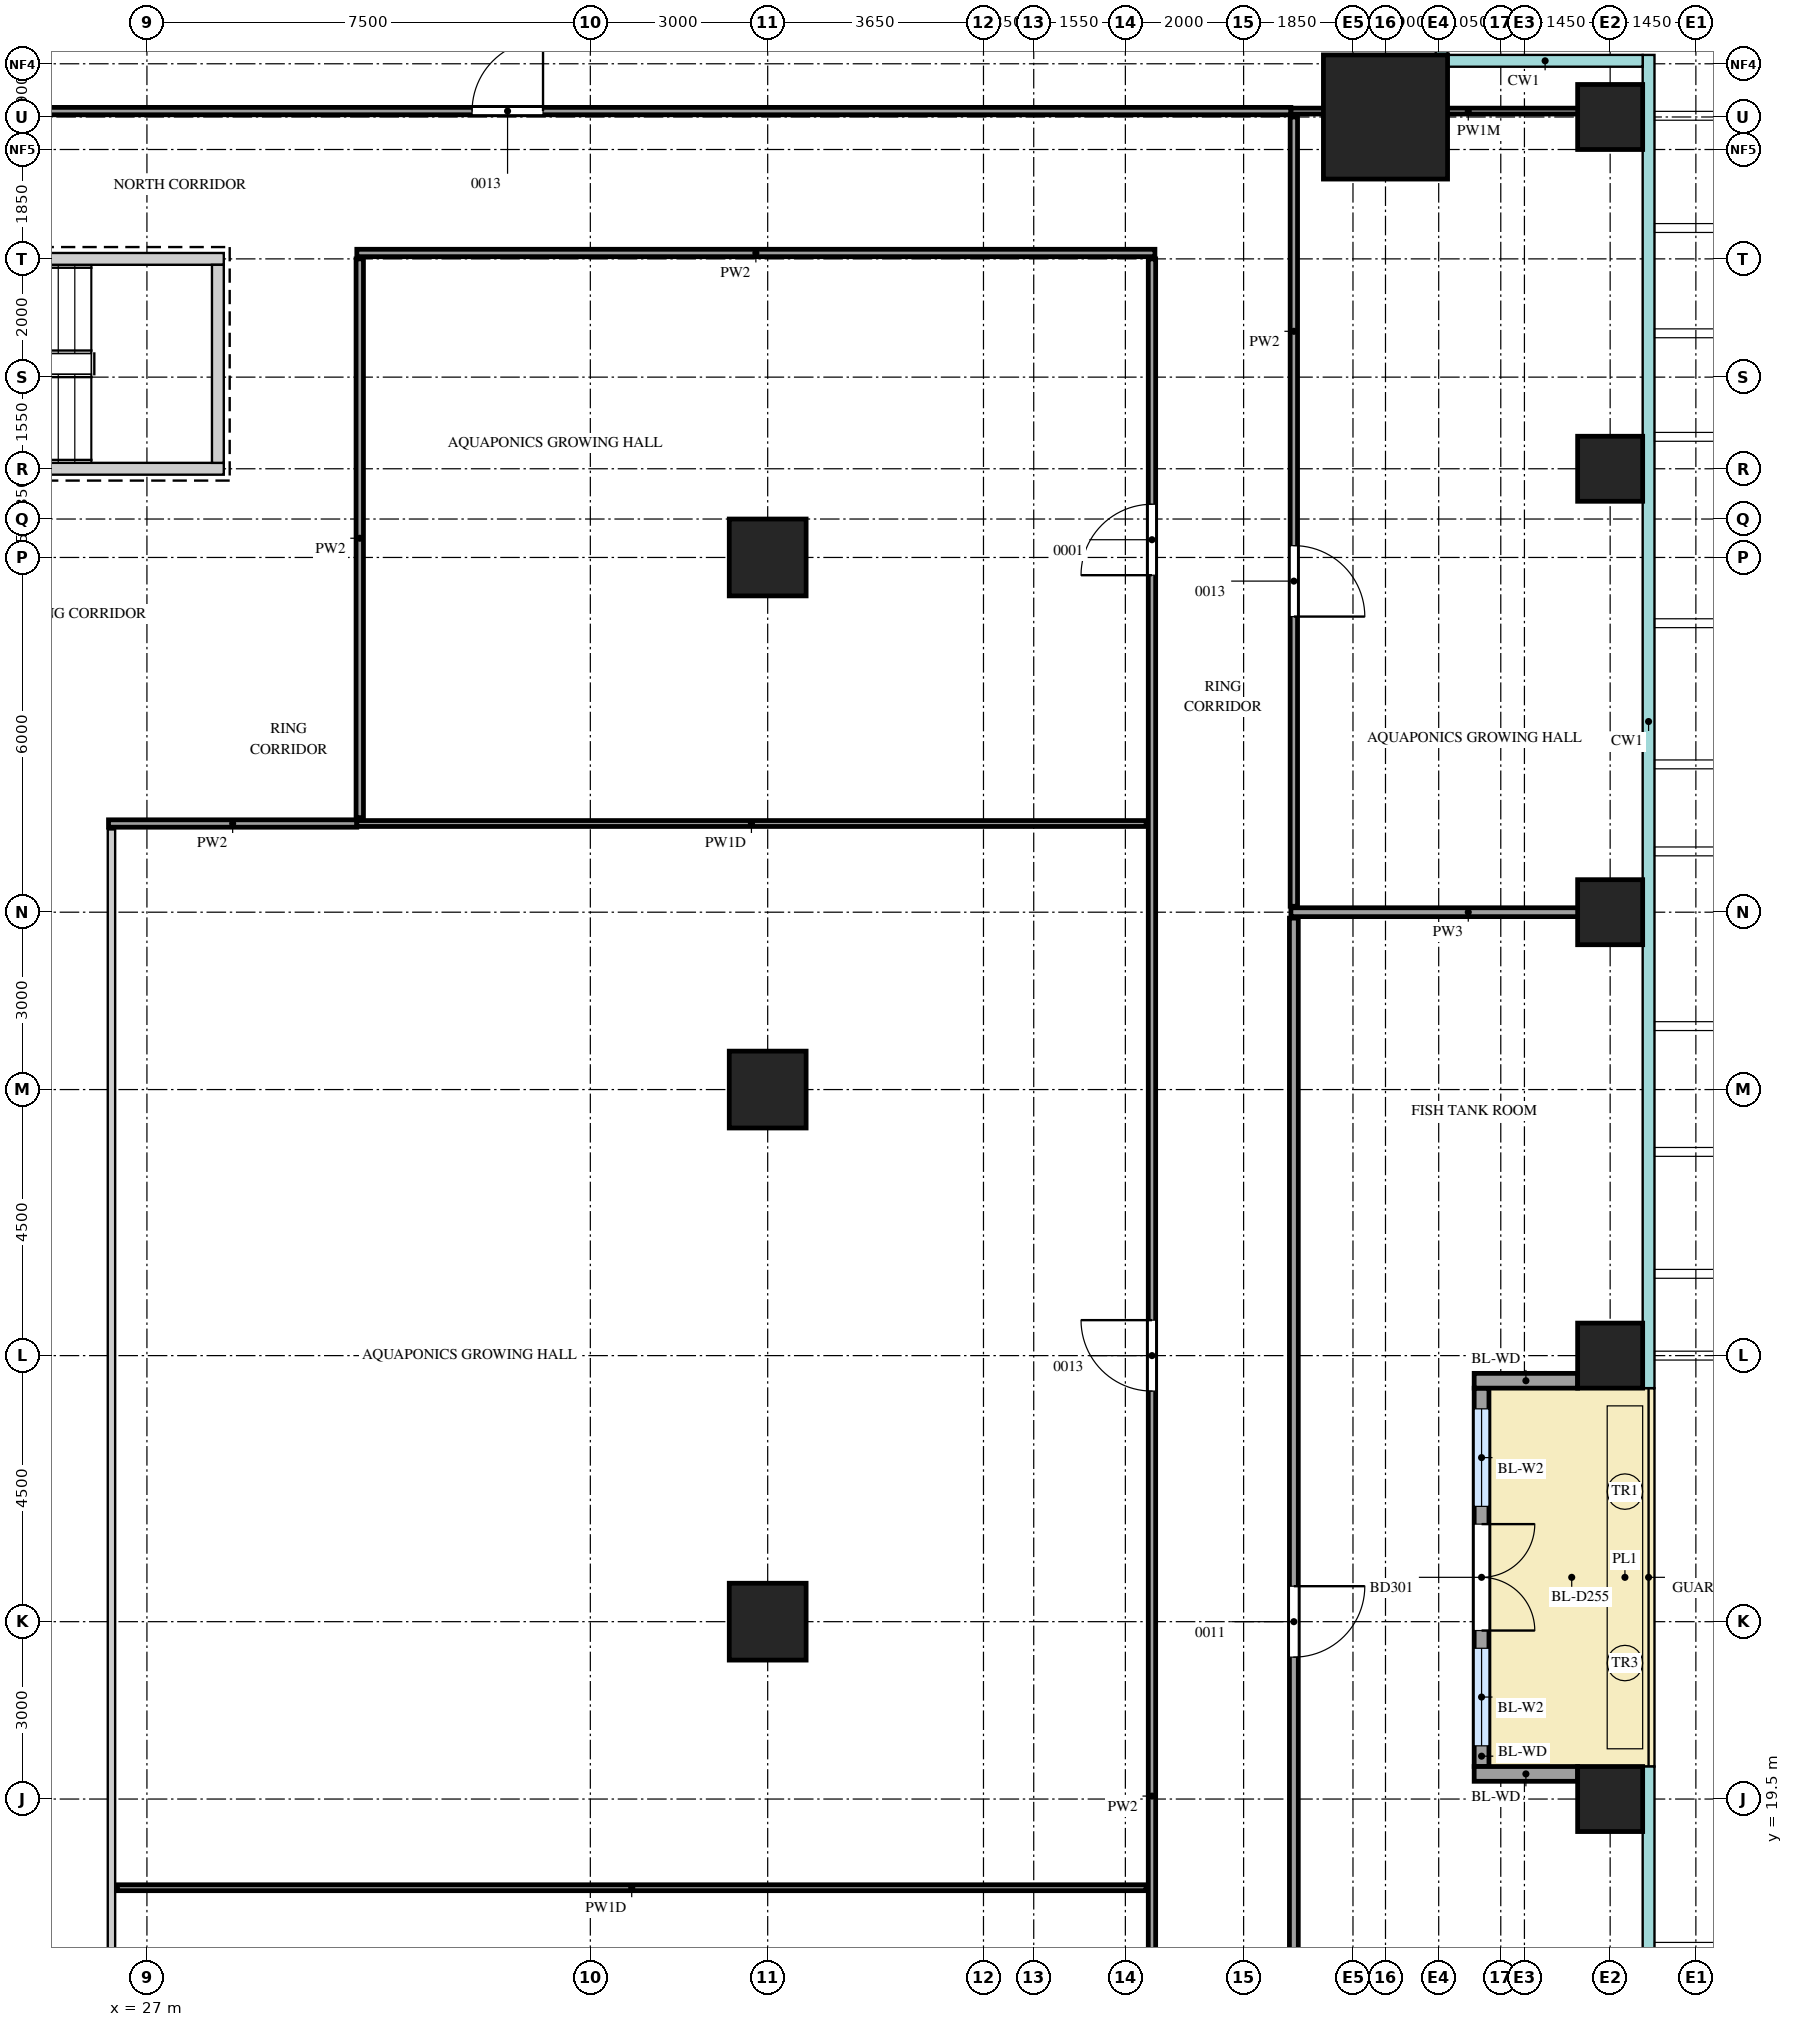
"""IFC4 building model, lengths in metres.
Left out: names, types, materials, properties, quantities, classifications, styles, units other than length and angle.
Written with IfcOpenShell. Run it as: python <this file> out.ifc"""

import sys

from ifc_helpers import new_model, si_unit, direction, frame, frame_2d, origin, origin_2d, place, context, subcontext, project, spatial, rectangle, extrude, source, transform, mapped, element, fill, save


model = new_model("IFC4")
c1 = context("Model", 3, precision=1e-05, world=origin(), true_north=direction((0.0, 1.0)))
c2 = subcontext(c1, "Body", "Model", "MODEL_VIEW")
j1 = project(units=[si_unit("LENGTHUNIT", "METRE"), si_unit("PLANEANGLEUNIT", "RADIAN")], contexts=[c1])
p1 = place(None, origin())
s1 = spatial("IfcSite", under=j1, at=p1, CompositionType="ELEMENT")
p2 = place(p1, origin())
s2 = spatial("IfcBuilding", under=s1, at=p2, CompositionType="ELEMENT")
p3 = place(p2, frame((0.0, 0.0, 141.1)))
s3 = spatial("IfcBuildingStorey", under=s2, at=p3, CompositionType="ELEMENT", Elevation=141.1)
m1 = source(origin(), c2, "Body", "SweptSolid", [
    extrude(rectangle(XDim=7.1, YDim=0.2, at=frame_2d((3.55, 0.0))), origin(), (0.0, 0.0, 1.0), 4.1),
])
p4 = place(p3, frame((21.2, 45.55, 0.0), z_axis=(0.0, 0.0, 1.0), x_axis=(1.0, 0.0, 0.0)))
e1 = element("IfcWall", 1, at=p4, inside=s3, PredefinedType="SHEAR", context=c2, shape_type="MappedRepresentation", body=[
    mapped(m1, transform((0.0, 0.0, 0.0))),
])
m2 = source(origin(), c2, "Body", "SweptSolid", [
    extrude(rectangle(XDim=1.2, YDim=2.1, at=frame_2d((0.6, 1.05))), frame((0.0, 0.11, 0.0), z_axis=(0.0, -1.0, 0.0), x_axis=(1.0, 0.0, 0.0)), (0.0, 0.0, 1.0), 0.22),
])
p5 = place(p4, frame((0.15, 0.0, 0.0)))
e2 = element("IfcOpeningElement", 2, at=p5, cuts=e1, PredefinedType="OPENING", context=c2, shape_type="MappedRepresentation", body=[
    mapped(m2, transform((0.0, 0.0, 0.0))),
])
p6 = place(p3, frame((21.2, 42.0, 0.0), z_axis=(0.0, 0.0, 1.0), x_axis=(1.0, 0.0, 0.0)))
e3 = element("IfcWall", 3, at=p6, inside=s3, PredefinedType="SHEAR", context=c2, shape_type="MappedRepresentation", body=[
    mapped(m1, transform((0.0, 0.0, 0.0))),
])
m3 = source(origin(), c2, "Body", "SweptSolid", [
    extrude(rectangle(XDim=3.35, YDim=0.2, at=frame_2d((1.675, 0.0))), origin(), (0.0, 0.0, 1.0), 4.1),
])
p7 = place(p3, frame((28.2, 42.1, 0.0), z_axis=(0.0, 0.0, 1.0), x_axis=(0.0, 1.0, 0.0)))
e4 = element("IfcWall", 4, at=p7, inside=s3, PredefinedType="SHEAR", context=c2, shape_type="MappedRepresentation", body=[
    mapped(m3, transform((0.0, 0.0, 0.0))),
])
m4 = source(origin(), c2, "Body", "SweptSolid", [
    extrude(rectangle(XDim=2.1, YDim=2.1, at=origin_2d()), origin(), (0.0, 0.0, 1.0), 4.4),
])
p8 = place(p3, frame((47.95, 47.95, 0.0), z_axis=(0.0, 0.0, 1.0), x_axis=(1.0, 0.0, 0.0)))
e5 = element("IfcColumn", 5, at=p8, inside=s3, PredefinedType="COLUMN", context=c2, shape_type="MappedRepresentation", body=[
    mapped(m4, transform((0.0, 0.0, 0.0))),
])
m5 = source(origin(), c2, "Body", "SweptSolid", [
    extrude(rectangle(XDim=1.1, YDim=1.1, at=origin_2d()), origin(), (0.0, 0.0, 1.0), 4.1),
])
for number, where, z_axis, x_axis in (
    (6, (51.75, 19.5, 0.0), (0.0, 0.0, 1.0), (1.0, 0.0, 0.0)),
    (7, (51.75, 27.0, 0.0), (0.0, 0.0, 1.0), (1.0, 0.0, 0.0)),
    (8, (51.75, 34.5, 0.0), (0.0, 0.0, 1.0), (1.0, 0.0, 0.0)),
    (9, (51.75, 42.0, 0.0), (0.0, 0.0, 1.0), (1.0, 0.0, 0.0)),
    (10, (51.75, 47.95, 0.0), (0.0, 0.0, 1.0), (1.0, 0.0, 0.0)),
):
    element("IfcColumn", number, at=place(p3, frame(where, z_axis=z_axis, x_axis=x_axis)), inside=s3, PredefinedType="COLUMN", context=c2, shape_type="MappedRepresentation", body=[
        mapped(m5, transform((0.0, 0.0, 0.0))),
    ])
m6 = source(origin(), c2, "Body", "SweptSolid", [
    extrude(rectangle(XDim=1.3, YDim=1.3, at=origin_2d()), origin(), (0.0, 0.0, 1.0), 4.1),
])
for number, where, z_axis, x_axis in (
    (11, (37.5, 22.5, 0.0), (0.0, 0.0, 1.0), (1.0, 0.0, 0.0)),
    (12, (37.5, 31.5, 0.0), (0.0, 0.0, 1.0), (1.0, 0.0, 0.0)),
    (13, (37.5, 40.5, 0.0), (0.0, 0.0, 1.0), (1.0, 0.0, 0.0)),
):
    element("IfcColumn", number, at=place(p3, frame(where, z_axis=z_axis, x_axis=x_axis)), inside=s3, PredefinedType="COLUMN", context=c2, shape_type="MappedRepresentation", body=[
        mapped(m6, transform((0.0, 0.0, 0.0))),
    ])
m7 = source(origin(), c2, "Body", "SweptSolid", [
    extrude(rectangle(XDim=6.4, YDim=0.25, at=frame_2d((3.2, 0.0))), origin(), (0.0, 0.0, 1.0), 3.55),
])
p9 = place(p3, frame((49.575, 20.05, 0.0), z_axis=(0.0, 0.0, 1.0), x_axis=(0.0, 1.0, 0.0)))
e14 = element("IfcWall", 14, at=p9, inside=s3, PredefinedType="SOLIDWALL", context=c2, shape_type="MappedRepresentation", body=[
    mapped(m7, transform((0.0, 0.0, 0.0))),
])
m8 = source(origin(), c2, "Body", "SweptSolid", [
    extrude(rectangle(XDim=1.65, YDim=2.4, at=frame_2d((0.825, 1.2))), frame((0.0, 0.135, 0.0), z_axis=(0.0, -1.0, 0.0), x_axis=(1.0, 0.0, 0.0)), (0.0, 0.0, 1.0), 0.27),
])
p10 = place(p9, frame((0.35, 0.0, 0.0)))
e15 = element("IfcOpeningElement", 15, at=p10, cuts=e14, PredefinedType="OPENING", context=c2, shape_type="MappedRepresentation", body=[
    mapped(m8, transform((0.0, 0.0, 0.0))),
])
p11 = place(p9, frame((4.4, 0.0, 0.0)))
e16 = element("IfcOpeningElement", 16, at=p11, cuts=e14, PredefinedType="OPENING", context=c2, shape_type="MappedRepresentation", body=[
    mapped(m8, transform((0.0, 0.0, 0.0))),
])
m9 = source(origin(), c2, "Body", "SweptSolid", [
    extrude(rectangle(XDim=1.8, YDim=2.4, at=frame_2d((0.9, 1.2))), frame((0.0, 0.135, 0.0), z_axis=(0.0, -1.0, 0.0), x_axis=(1.0, 0.0, 0.0)), (0.0, 0.0, 1.0), 0.27),
])
p12 = place(p9, frame((2.3, 0.0, 0.0)))
e17 = element("IfcOpeningElement", 17, at=p12, cuts=e14, PredefinedType="OPENING", context=c2, shape_type="MappedRepresentation", body=[
    mapped(m9, transform((0.0, 0.0, 0.0))),
])
m10 = source(origin(), c2, "Body", "SweptSolid", [
    extrude(rectangle(XDim=1.75, YDim=0.25, at=frame_2d((0.875, 0.0))), origin(), (0.0, 0.0, 1.0), 3.55),
])
for number, where, z_axis, x_axis in (
    (18, (51.2, 19.925, 0.0), (0.0, 0.0, 1.0), (-1.0, 0.0, 0.0)),
    (19, (51.2, 26.575, 0.0), (0.0, 0.0, 1.0), (-1.0, 0.0, 0.0)),
):
    element("IfcWall", number, at=place(p3, frame(where, z_axis=z_axis, x_axis=x_axis)), inside=s3, PredefinedType="SOLIDWALL", context=c2, shape_type="MappedRepresentation", body=[
        mapped(m10, transform((0.0, 0.0, 0.0))),
    ])
m11 = source(origin(), c2, "Body", "SweptSolid", [
    extrude(rectangle(XDim=24.1, YDim=0.15, at=frame_2d((12.05, 0.0))), origin(), (0.0, 0.0, 1.0), 4.2),
])
p13 = place(p3, frame((46.4, 10.3, 0.0), z_axis=(0.0, 0.0, 1.0), x_axis=(0.0, 1.0, 0.0)))
e20 = element("IfcWall", 20, at=p13, inside=s3, PredefinedType="PARTITIONING", context=c2, shape_type="MappedRepresentation", body=[
    mapped(m11, transform((0.0, 0.0, 0.0))),
])
m12 = source(origin(), c2, "Body", "SweptSolid", [
    extrude(rectangle(XDim=1.2, YDim=2.1, at=frame_2d((0.6, 1.05))), frame((0.0, 0.085, 0.0), z_axis=(0.0, -1.0, 0.0), x_axis=(1.0, 0.0, 0.0)), (0.0, 0.0, 1.0), 0.17),
])
p14 = place(p13, frame((11.6, 0.0, 0.0)))
e21 = element("IfcOpeningElement", 21, at=p14, cuts=e20, PredefinedType="OPENING", context=c2, shape_type="MappedRepresentation", body=[
    mapped(m12, transform((0.0, 0.0, 0.0))),
])
m13 = source(origin(), c2, "Body", "SweptSolid", [
    extrude(rectangle(XDim=23.2, YDim=0.125, at=frame_2d((11.6, 0.0))), origin(), (0.0, 0.0, 1.0), 4.2),
])
p15 = place(p3, frame((26.4, 12.7, 0.0), z_axis=(0.0, 0.0, 1.0), x_axis=(0.0, 1.0, 0.0)))
e22 = element("IfcWall", 22, at=p15, inside=s3, PredefinedType="PARTITIONING", context=c2, shape_type="MappedRepresentation", body=[
    mapped(m13, transform((0.0, 0.0, 0.0))),
])
m14 = source(origin(), c2, "Body", "SweptSolid", [
    extrude(rectangle(XDim=0.9, YDim=2.1, at=frame_2d((0.45, 1.05))), frame((0.0, 0.073, 0.0), z_axis=(0.0, -1.0, 0.0), x_axis=(1.0, 0.0, 0.0)), (0.0, 0.0, 1.0), 0.145),
])
p16 = place(p15, frame((2.15, 0.0, 0.0)))
e23 = element("IfcOpeningElement", 23, at=p16, cuts=e22, PredefinedType="OPENING", context=c2, shape_type="MappedRepresentation", body=[
    mapped(m14, transform((0.0, 0.0, 0.0))),
])
m15 = source(origin(), c2, "Body", "SweptSolid", [
    extrude(rectangle(XDim=32.85, YDim=0.125, at=frame_2d((16.425, 0.0))), origin(), (0.0, 0.0, 1.0), 4.2),
])
p17 = place(p3, frame((44.0, 12.7, 0.0), z_axis=(0.0, 0.0, 1.0), x_axis=(0.0, 1.0, 0.0)))
e24 = element("IfcWall", 24, at=p17, inside=s3, PredefinedType="PARTITIONING", context=c2, shape_type="MappedRepresentation", body=[
    mapped(m15, transform((0.0, 0.0, 0.0))),
])
m16 = source(origin(), c2, "Body", "SweptSolid", [
    extrude(rectangle(XDim=1.2, YDim=2.1, at=frame_2d((0.6, 1.05))), frame((0.0, 0.073, 0.0), z_axis=(0.0, -1.0, 0.0), x_axis=(1.0, 0.0, 0.0)), (0.0, 0.0, 1.0), 0.145),
])
p18 = place(p17, frame((13.7, 0.0, 0.0)))
e25 = element("IfcOpeningElement", 25, at=p18, cuts=e24, PredefinedType="OPENING", context=c2, shape_type="MappedRepresentation", body=[
    mapped(m16, transform((0.0, 0.0, 0.0))),
])
p19 = place(p17, frame((27.5, 0.0, 0.0)))
e26 = element("IfcOpeningElement", 26, at=p19, cuts=e24, PredefinedType="OPENING", context=c2, shape_type="MappedRepresentation", body=[
    mapped(m16, transform((0.0, 0.0, 0.0))),
])
m17 = source(origin(), c2, "Body", "SweptSolid", [
    extrude(rectangle(XDim=17.4, YDim=0.1, at=frame_2d((8.7, 0.0))), origin(), (0.0, 0.0, 1.0), 4.2),
])
p20 = place(p3, frame((26.5, 18.0, 0.0), z_axis=(0.0, 0.0, 1.0), x_axis=(1.0, 0.0, 0.0)))
e27 = element("IfcWall", 27, at=p20, inside=s3, PredefinedType="PARTITIONING", context=c2, shape_type="MappedRepresentation", body=[
    mapped(m17, transform((0.0, 0.0, 0.0))),
])
m18 = source(origin(), c2, "Body", "SweptSolid", [
    extrude(rectangle(XDim=6.0, YDim=0.15, at=frame_2d((3.0, 0.0))), origin(), (0.0, 0.0, 1.0), 4.2),
])
p21 = place(p3, frame((46.35, 34.5, 0.0), z_axis=(0.0, 0.0, 1.0), x_axis=(1.0, 0.0, 0.0)))
e28 = element("IfcWall", 28, at=p21, inside=s3, PredefinedType="PARTITIONING", context=c2, shape_type="MappedRepresentation", body=[
    mapped(m18, transform((0.0, 0.0, 0.0))),
])
m19 = source(origin(), c2, "Body", "SweptSolid", [
    extrude(rectangle(XDim=13.35, YDim=0.125, at=frame_2d((6.675, 0.0))), origin(), (0.0, 0.0, 1.0), 4.2),
])
p22 = place(p3, frame((46.4, 34.6, 0.0), z_axis=(0.0, 0.0, 1.0), x_axis=(0.0, 1.0, 0.0)))
e29 = element("IfcWall", 29, at=p22, inside=s3, PredefinedType="PARTITIONING", context=c2, shape_type="MappedRepresentation", body=[
    mapped(m19, transform((0.0, 0.0, 0.0))),
])
p23 = place(p22, frame((4.9, 0.0, 0.0)))
e30 = element("IfcOpeningElement", 30, at=p23, cuts=e29, PredefinedType="OPENING", context=c2, shape_type="MappedRepresentation", body=[
    mapped(m16, transform((0.0, 0.0, 0.0))),
])
m20 = source(origin(), c2, "Body", "SweptSolid", [
    extrude(rectangle(XDim=4.2, YDim=0.125, at=frame_2d((2.1, 0.0))), origin(), (0.0, 0.0, 1.0), 4.2),
])
p24 = place(p3, frame((26.35, 36.0, 0.0), z_axis=(0.0, 0.0, 1.0), x_axis=(1.0, 0.0, 0.0)))
e31 = element("IfcWall", 31, at=p24, inside=s3, PredefinedType="PARTITIONING", context=c2, shape_type="MappedRepresentation", body=[
    mapped(m20, transform((0.0, 0.0, 0.0))),
])
m21 = source(origin(), c2, "Body", "SweptSolid", [
    extrude(rectangle(XDim=13.35, YDim=0.1, at=frame_2d((6.675, 0.0))), origin(), (0.0, 0.0, 1.0), 4.2),
])
p25 = place(p3, frame((30.55, 36.0, 0.0), z_axis=(0.0, 0.0, 1.0), x_axis=(1.0, 0.0, 0.0)))
e32 = element("IfcWall", 32, at=p25, inside=s3, PredefinedType="PARTITIONING", context=c2, shape_type="MappedRepresentation", body=[
    mapped(m21, transform((0.0, 0.0, 0.0))),
])
m22 = source(origin(), c2, "Body", "SweptSolid", [
    extrude(rectangle(XDim=9.45, YDim=0.125, at=frame_2d((4.725, 0.0))), origin(), (0.0, 0.0, 1.0), 4.2),
])
p26 = place(p3, frame((30.6, 36.1, 0.0), z_axis=(0.0, 0.0, 1.0), x_axis=(0.0, 1.0, 0.0)))
e33 = element("IfcWall", 33, at=p26, inside=s3, PredefinedType="PARTITIONING", context=c2, shape_type="MappedRepresentation", body=[
    mapped(m22, transform((0.0, 0.0, 0.0))),
])
m23 = source(origin(), c2, "Body", "SweptSolid", [
    extrude(rectangle(XDim=13.5, YDim=0.125, at=frame_2d((6.75, 0.0))), origin(), (0.0, 0.0, 1.0), 4.2),
])
p27 = place(p3, frame((30.55, 45.65, 0.0), z_axis=(0.0, 0.0, 1.0), x_axis=(1.0, 0.0, 0.0)))
e34 = element("IfcWall", 34, at=p27, inside=s3, PredefinedType="PARTITIONING", context=c2, shape_type="MappedRepresentation", body=[
    mapped(m23, transform((0.0, 0.0, 0.0))),
])
m24 = source(origin(), c2, "Body", "SweptSolid", [
    extrude(rectangle(XDim=42.05, YDim=0.125, at=frame_2d((21.025, 0.0))), origin(), (0.0, 0.0, 1.0), 3.55),
])
p28 = place(p3, frame((4.3, 48.05, 0.0), z_axis=(0.0, 0.0, 1.0), x_axis=(1.0, 0.0, 0.0)))
e35 = element("IfcWall", 35, at=p28, inside=s3, PredefinedType="PARTITIONING", context=c2, shape_type="MappedRepresentation", body=[
    mapped(m24, transform((0.0, 0.0, 0.0))),
])
p29 = place(p28, frame((7.1, 0.0, 0.0)))
e36 = element("IfcOpeningElement", 36, at=p29, cuts=e35, PredefinedType="OPENING", context=c2, shape_type="MappedRepresentation", body=[
    mapped(m14, transform((0.0, 0.0, 0.0))),
])
p30 = place(p28, frame((28.2, 0.0, 0.0)))
e37 = element("IfcOpeningElement", 37, at=p30, cuts=e35, PredefinedType="OPENING", context=c2, shape_type="MappedRepresentation", body=[
    mapped(m16, transform((0.0, 0.0, 0.0))),
])
m25 = source(origin(), c2, "Body", "SweptSolid", [
    extrude(rectangle(XDim=6.0, YDim=0.1, at=frame_2d((3.0, 0.0))), origin(), (0.0, 0.0, 1.0), 3.55),
])
p31 = place(p3, frame((46.35, 48.05, 0.0), z_axis=(0.0, 0.0, 1.0), x_axis=(1.0, 0.0, 0.0)))
e38 = element("IfcWall", 38, at=p31, inside=s3, PredefinedType="PARTITIONING", context=c2, shape_type="MappedRepresentation", body=[
    mapped(m25, transform((0.0, 0.0, 0.0))),
])
m26 = source(origin(), c2, "Body", "SweptSolid", [
    extrude(rectangle(XDim=1.65, YDim=2.4, at=frame_2d((0.825, 1.2))), frame((0.0, 0.03, 0.0), z_axis=(0.0, -1.0, 0.0), x_axis=(1.0, 0.0, 0.0)), (0.0, 0.0, 1.0), 0.06),
])
p32 = place(p10, origin())
e39 = element("IfcWindow", 39, at=p32, inside=s3, PartitioningType="SINGLE_PANEL", PredefinedType="WINDOW", context=c2, shape_type="MappedRepresentation", body=[
    mapped(m26, transform((0.0, 0.0, 0.0))),
])
fill(e15, e39)
p33 = place(p11, origin())
e40 = element("IfcWindow", 40, at=p33, inside=s3, PartitioningType="SINGLE_PANEL", PredefinedType="WINDOW", context=c2, shape_type="MappedRepresentation", body=[
    mapped(m26, transform((0.0, 0.0, 0.0))),
])
fill(e16, e40)
m27 = source(origin(), c2, "Body", "SweptSolid", [
    extrude(rectangle(XDim=1.8, YDim=2.4, at=frame_2d((0.9, 1.2))), frame((0.0, 0.025, 0.0), z_axis=(0.0, -1.0, 0.0), x_axis=(1.0, 0.0, 0.0)), (0.0, 0.0, 1.0), 0.05),
])
p34 = place(p12, origin())
e41 = element("IfcDoor", 41, at=p34, inside=s3, OperationType="DOUBLE_DOOR_DOUBLE_SWING", PredefinedType="DOOR", context=c2, shape_type="MappedRepresentation", body=[
    mapped(m27, transform((0.0, 0.0, 0.0))),
])
fill(e17, e41)
m28 = source(origin(), c2, "Body", "SweptSolid", [
    extrude(rectangle(XDim=1.2, YDim=2.1, at=frame_2d((0.6, 1.05))), frame((0.0, 0.025, 0.0), z_axis=(0.0, -1.0, 0.0), x_axis=(1.0, 0.0, 0.0)), (0.0, 0.0, 1.0), 0.05),
])
p35 = place(p18, origin())
e42 = element("IfcDoor", 42, at=p35, inside=s3, OperationType="SINGLE_SWING_LEFT", PredefinedType="DOOR", context=c2, shape_type="MappedRepresentation", body=[
    mapped(m28, transform((0.0, 0.0, 0.0))),
])
fill(e25, e42)
p36 = place(p19, origin())
e43 = element("IfcDoor", 43, at=p36, inside=s3, OperationType="SINGLE_SWING_RIGHT", PredefinedType="DOOR", context=c2, shape_type="MappedRepresentation", body=[
    mapped(m28, transform((0.0, 0.0, 0.0))),
])
fill(e26, e43)
p37 = place(p14, origin())
e44 = element("IfcDoor", 44, at=p37, inside=s3, OperationType="SINGLE_SWING_RIGHT", PredefinedType="DOOR", context=c2, shape_type="MappedRepresentation", body=[
    mapped(m28, transform((0.0, 0.0, 0.0))),
])
fill(e21, e44)
p38 = place(p23, origin())
e45 = element("IfcDoor", 45, at=p38, inside=s3, OperationType="SINGLE_SWING_LEFT", PredefinedType="DOOR", context=c2, shape_type="MappedRepresentation", body=[
    mapped(m28, transform((0.0, 0.0, 0.0))),
])
fill(e30, e45)
p39 = place(p30, origin())
e46 = element("IfcDoor", 46, at=p39, inside=s3, OperationType="SINGLE_SWING_LEFT", PredefinedType="DOOR", context=c2, shape_type="MappedRepresentation", body=[
    mapped(m28, transform((0.0, 0.0, 0.0))),
])
fill(e37, e46)
save(model, sys.argv[1])
